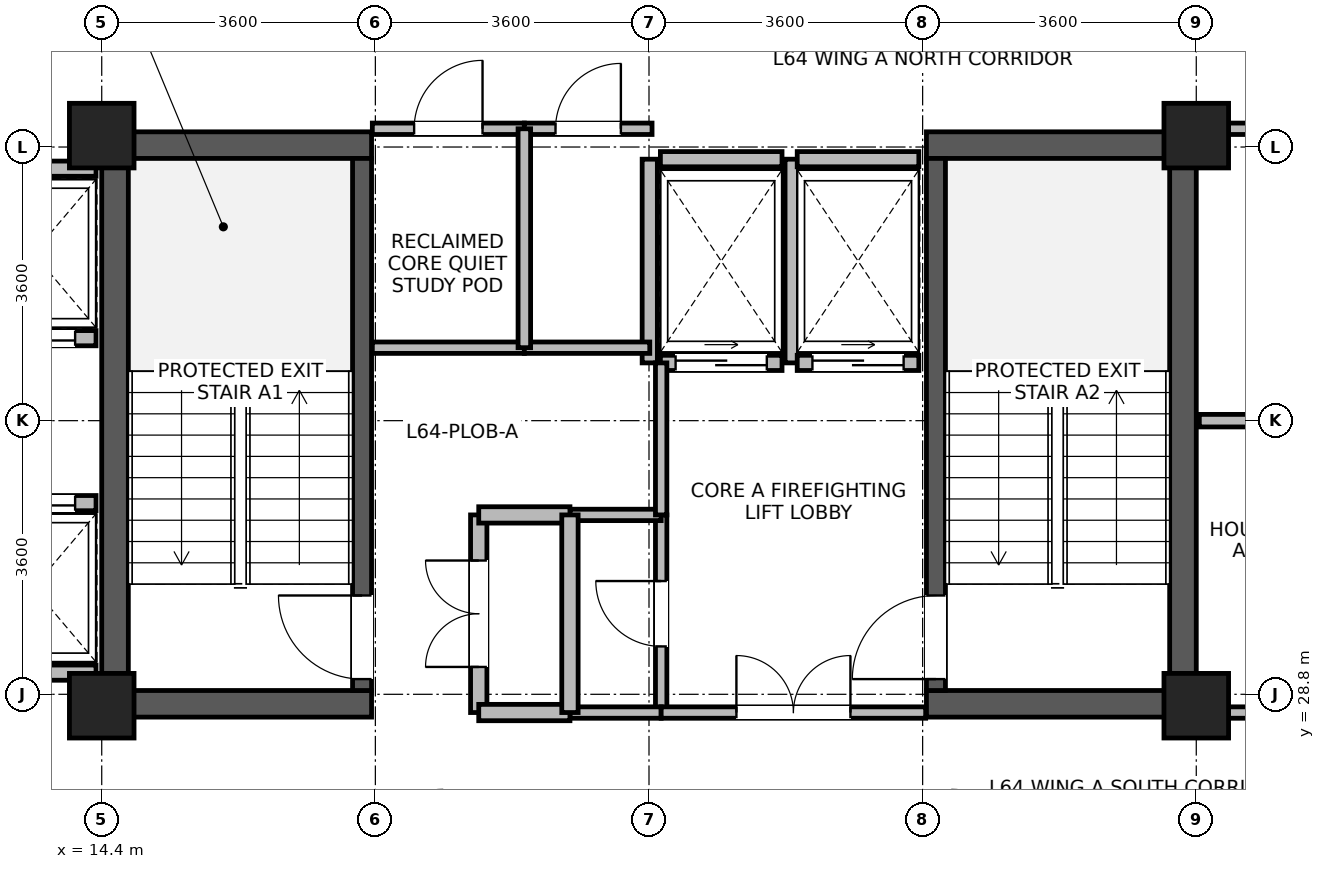
"""IFC4 building model, lengths in metres.
Left out: names, types, materials, properties, quantities, classifications, styles, units other than length and angle.
Written with IfcOpenShell. Run it as: python <this file> out.ifc"""

import sys

from ifc_helpers import new_model, si_unit, direction, frame, frame_2d, origin, origin_2d, place, context, subcontext, project, spatial, rectangle, extrude, source, transform, mapped, element, fill, save


model = new_model("IFC4")
c1 = context("Model", 3, precision=1e-05, world=origin(), true_north=direction((0.0, 1.0)))
c2 = subcontext(c1, "Body", "Model", "MODEL_VIEW")
j1 = project(units=[si_unit("LENGTHUNIT", "METRE"), si_unit("PLANEANGLEUNIT", "RADIAN")], contexts=[c1])
p1 = place(None, origin())
s1 = spatial("IfcSite", under=j1, at=p1, CompositionType="ELEMENT")
p2 = place(p1, origin())
s2 = spatial("IfcBuilding", under=s1, at=p2, CompositionType="ELEMENT")
p3 = place(p2, frame((0.0, 0.0, 249.9)))
s3 = spatial("IfcBuildingStorey", under=s2, at=p3, CompositionType="ELEMENT", Elevation=249.9)
for number, where, z_axis, x_axis in (
    (1, (14.575, 28.5, 0.0), (0.0, 0.0, 1.0), (0.0, 1.0, 0.0)),
    (2, (28.625, 28.5, 0.0), (0.0, 0.0, 1.0), (0.0, 1.0, 0.0)),
):
    element("IfcWall", number, at=place(p3, frame(where, z_axis=z_axis, x_axis=x_axis)), inside=s3, PredefinedType="SHEAR", context=c2, shape_type="SweptSolid", body=[
        extrude(rectangle(XDim=7.7, YDim=0.35, at=frame_2d((3.85, 0.0))), origin(), (0.0, 0.0, 1.0), 3.475),
    ])
for number, where, z_axis, x_axis in (
    (3, (14.75, 28.675, 0.0), (0.0, 0.0, 1.0), (1.0, 0.0, 0.0)),
    (4, (25.25, 28.675, 0.0), (0.0, 0.0, 1.0), (1.0, 0.0, 0.0)),
    (5, (14.75, 36.025, 0.0), (0.0, 0.0, 1.0), (1.0, 0.0, 0.0)),
    (6, (25.25, 36.025, 0.0), (0.0, 0.0, 1.0), (1.0, 0.0, 0.0)),
):
    element("IfcWall", number, at=place(p3, frame(where, z_axis=z_axis, x_axis=x_axis)), inside=s3, PredefinedType="SHEAR", context=c2, shape_type="SweptSolid", body=[
        extrude(rectangle(XDim=3.2, YDim=0.35, at=frame_2d((1.6, 0.0))), origin(), (0.0, 0.0, 1.0), 3.475),
    ])
p4 = place(p3, frame((17.825, 28.85, 0.0), z_axis=(0.0, 0.0, 1.0), x_axis=(0.0, 1.0, 0.0)))
e7 = element("IfcWall", 7, at=p4, inside=s3, PredefinedType="SHEAR", context=c2, shape_type="SweptSolid", body=[
    extrude(rectangle(XDim=7.0, YDim=0.25, at=frame_2d((3.5, 0.0))), origin(), (0.0, 0.0, 1.0), 3.475),
])
p5 = place(p4, frame((0.15, 0.0, 0.0)))
e8 = element("IfcOpeningElement", 8, at=p5, cuts=e7, PredefinedType="OPENING", context=c2, shape_type="SweptSolid", body=[
    extrude(rectangle(XDim=1.1, YDim=2.08, at=frame_2d((0.55, 1.04))), frame((0.0, 0.135, 0.0), z_axis=(0.0, -1.0, 0.0), x_axis=(1.0, 0.0, 0.0)), (0.0, 0.0, 1.0), 0.27),
])
p6 = place(p3, frame((25.375, 28.85, 0.0), z_axis=(0.0, 0.0, 1.0), x_axis=(0.0, 1.0, 0.0)))
e9 = element("IfcWall", 9, at=p6, inside=s3, PredefinedType="SHEAR", context=c2, shape_type="SweptSolid", body=[
    extrude(rectangle(XDim=7.0, YDim=0.25, at=frame_2d((3.5, 0.0))), origin(), (0.0, 0.0, 1.0), 3.475),
])
p7 = place(p6, frame((0.15, 0.0, 0.0)))
e10 = element("IfcOpeningElement", 10, at=p7, cuts=e9, PredefinedType="OPENING", context=c2, shape_type="SweptSolid", body=[
    extrude(rectangle(XDim=1.1, YDim=2.08, at=frame_2d((0.55, 1.04))), frame((0.0, 0.135, 0.0), z_axis=(0.0, -1.0, 0.0), x_axis=(1.0, 0.0, 0.0)), (0.0, 0.0, 1.0), 0.27),
])
m1 = source(origin(), c2, "Body", "SweptSolid", [
    extrude(rectangle(XDim=0.85, YDim=0.85, at=origin_2d()), origin(), (0.0, 0.0, 1.0), 3.7),
])
for number, where, z_axis, x_axis in (
    (11, (14.4, 28.65, 0.0), (0.0, 0.0, 1.0), (1.0, 0.0, 0.0)),
    (12, (14.4, 36.15, 0.0), (0.0, 0.0, 1.0), (1.0, 0.0, 0.0)),
    (13, (28.8, 28.65, 0.0), (0.0, 0.0, 1.0), (1.0, 0.0, 0.0)),
    (14, (28.8, 36.15, 0.0), (0.0, 0.0, 1.0), (1.0, 0.0, 0.0)),
):
    element("IfcColumn", number, at=place(p3, frame(where, z_axis=z_axis, x_axis=x_axis)), inside=s3, PredefinedType="COLUMN", context=c2, shape_type="MappedRepresentation", body=[
        mapped(m1, transform((0.0, 0.0, 0.0), x_axis=(1.0, 0.0, 0.0), y_axis=(0.0, 1.0, 0.0), z_axis=(0.0, 0.0, 1.0), scale=1.0)),
    ])
p8 = place(p3, frame((12.675, 33.485, 0.0), z_axis=(0.0, 0.0, 1.0), x_axis=(1.0, 0.0, 0.0)))
e15 = element("IfcWall", 15, at=p8, inside=s3, PredefinedType="PARTITIONING", context=c2, shape_type="SweptSolid", body=[
    extrude(rectangle(XDim=1.65, YDim=0.2, at=frame_2d((0.825, 0.0))), origin(), (0.0, 0.0, 1.0), 3.455),
])
p9 = place(p8, frame((0.275, 0.0, 0.0)))
e16 = element("IfcOpeningElement", 16, at=p9, cuts=e15, PredefinedType="OPENING", context=c2, shape_type="SweptSolid", body=[
    extrude(rectangle(XDim=1.1, YDim=2.12, at=frame_2d((0.55, 1.06))), frame((0.0, 0.11, 0.0), z_axis=(0.0, -1.0, 0.0), x_axis=(1.0, 0.0, 0.0)), (0.0, 0.0, 1.0), 0.22),
])
for number, where, z_axis, x_axis in (
    (17, (12.675, 35.715, 0.0), (0.0, 0.0, 1.0), (1.0, 0.0, 0.0)),
    (18, (12.675, 29.085, 0.0), (0.0, 0.0, 1.0), (1.0, 0.0, 0.0)),
):
    element("IfcWall", number, at=place(p3, frame(where, z_axis=z_axis, x_axis=x_axis)), inside=s3, PredefinedType="PARTITIONING", context=c2, shape_type="SweptSolid", body=[
        extrude(rectangle(XDim=1.65, YDim=0.2, at=frame_2d((0.825, 0.0))), origin(), (0.0, 0.0, 1.0), 3.455),
    ])
p10 = place(p3, frame((12.675, 31.315, 0.0), z_axis=(0.0, 0.0, 1.0), x_axis=(1.0, 0.0, 0.0)))
e19 = element("IfcWall", 19, at=p10, inside=s3, PredefinedType="PARTITIONING", context=c2, shape_type="SweptSolid", body=[
    extrude(rectangle(XDim=1.65, YDim=0.2, at=frame_2d((0.825, 0.0))), origin(), (0.0, 0.0, 1.0), 3.455),
])
p11 = place(p10, frame((0.275, 0.0, 0.0)))
e20 = element("IfcOpeningElement", 20, at=p11, cuts=e19, PredefinedType="OPENING", context=c2, shape_type="SweptSolid", body=[
    extrude(rectangle(XDim=1.1, YDim=2.12, at=frame_2d((0.55, 1.06))), frame((0.0, 0.11, 0.0), z_axis=(0.0, -1.0, 0.0), x_axis=(1.0, 0.0, 0.0)), (0.0, 0.0, 1.0), 0.22),
])
p12 = place(p3, frame((21.75, 33.16, 0.0), z_axis=(0.0, 0.0, 1.0), x_axis=(1.0, 0.0, 0.0)))
e21 = element("IfcWall", 21, at=p12, inside=s3, PredefinedType="PARTITIONING", context=c2, shape_type="SweptSolid", body=[
    extrude(rectangle(XDim=1.6, YDim=0.2, at=frame_2d((0.8, 0.0))), origin(), (0.0, 0.0, 1.0), 3.455),
])
p13 = place(p12, frame((0.2, 0.0, 0.0)))
e22 = element("IfcOpeningElement", 22, at=p13, cuts=e21, PredefinedType="OPENING", context=c2, shape_type="SweptSolid", body=[
    extrude(rectangle(XDim=1.2, YDim=2.12, at=frame_2d((0.6, 1.06))), frame((0.0, 0.11, 0.0), z_axis=(0.0, -1.0, 0.0), x_axis=(1.0, 0.0, 0.0)), (0.0, 0.0, 1.0), 0.22),
])
p14 = place(p3, frame((21.75, 35.84, 0.0), z_axis=(0.0, 0.0, 1.0), x_axis=(1.0, 0.0, 0.0)))
e23 = element("IfcWall", 23, at=p14, inside=s3, PredefinedType="PARTITIONING", context=c2, shape_type="SweptSolid", body=[
    extrude(rectangle(XDim=1.6, YDim=0.2, at=frame_2d((0.8, 0.0))), origin(), (0.0, 0.0, 1.0), 2.555),
])
for number, where, z_axis, x_axis in (
    (24, (21.61, 33.16, 0.0), (0.0, 0.0, 1.0), (0.0, 1.0, 0.0)),
    (25, (23.49, 33.16, 0.0), (0.0, 0.0, 1.0), (0.0, 1.0, 0.0)),
):
    element("IfcWall", number, at=place(p3, frame(where, z_axis=z_axis, x_axis=x_axis)), inside=s3, PredefinedType="PARTITIONING", context=c2, shape_type="SweptSolid", body=[
        extrude(rectangle(XDim=2.68, YDim=0.2, at=frame_2d((1.34, 0.0))), origin(), (0.0, 0.0, 1.0), 3.455),
    ])
p15 = place(p3, frame((23.55, 33.16, 0.0), z_axis=(0.0, 0.0, 1.0), x_axis=(1.0, 0.0, 0.0)))
e26 = element("IfcWall", 26, at=p15, inside=s3, PredefinedType="PARTITIONING", context=c2, shape_type="SweptSolid", body=[
    extrude(rectangle(XDim=1.6, YDim=0.2, at=frame_2d((0.8, 0.0))), origin(), (0.0, 0.0, 1.0), 3.455),
])
p16 = place(p15, frame((0.2, 0.0, 0.0)))
e27 = element("IfcOpeningElement", 27, at=p16, cuts=e26, PredefinedType="OPENING", context=c2, shape_type="SweptSolid", body=[
    extrude(rectangle(XDim=1.2, YDim=2.12, at=frame_2d((0.6, 1.06))), frame((0.0, 0.11, 0.0), z_axis=(0.0, -1.0, 0.0), x_axis=(1.0, 0.0, 0.0)), (0.0, 0.0, 1.0), 0.22),
])
p17 = place(p3, frame((23.55, 35.84, 0.0), z_axis=(0.0, 0.0, 1.0), x_axis=(1.0, 0.0, 0.0)))
e28 = element("IfcWall", 28, at=p17, inside=s3, PredefinedType="PARTITIONING", context=c2, shape_type="SweptSolid", body=[
    extrude(rectangle(XDim=1.6, YDim=0.2, at=frame_2d((0.8, 0.0))), origin(), (0.0, 0.0, 1.0), 2.555),
])
p18 = place(p3, frame((29.225, 36.24, 0.0), z_axis=(0.0, 0.0, 1.0), x_axis=(1.0, 0.0, 0.0)))
e29 = element("IfcWall", 29, at=p18, inside=s3, PredefinedType="PARTITIONING", context=c2, shape_type="SweptSolid", body=[
    extrude(rectangle(XDim=4.135, YDim=0.15, at=frame_2d((2.067, 0.0))), origin(), (0.0, 0.0, 1.0), 2.905),
])
p19 = place(p18, frame((1.417, 0.0, 0.0)))
e30 = element("IfcOpeningElement", 30, at=p19, cuts=e29, PredefinedType="OPENING", context=c2, shape_type="SweptSolid", body=[
    extrude(rectangle(XDim=1.3, YDim=2.12, at=frame_2d((0.65, 1.06))), frame((0.0, 0.085, 0.0), z_axis=(0.0, -1.0, 0.0), x_axis=(1.0, 0.0, 0.0)), (0.0, 0.0, 1.0), 0.17),
])
p20 = place(p3, frame((19.36, 28.56, 0.0), z_axis=(0.0, 0.0, 1.0), x_axis=(0.0, 1.0, 0.0)))
e31 = element("IfcWall", 31, at=p20, inside=s3, PredefinedType="PARTITIONING", context=c2, shape_type="SweptSolid", body=[
    extrude(rectangle(XDim=2.6, YDim=0.215, at=frame_2d((1.3, 0.0))), origin(), (0.0, 0.0, 1.0), 3.455),
])
p21 = place(p20, frame((0.6, 0.0, 0.0)))
e32 = element("IfcOpeningElement", 32, at=p21, cuts=e31, PredefinedType="OPENING", context=c2, shape_type="SweptSolid", body=[
    extrude(rectangle(XDim=1.4, YDim=2.15, at=frame_2d((0.7, 1.075))), frame((0.0, 0.118, 0.0), z_axis=(0.0, -1.0, 0.0), x_axis=(1.0, 0.0, 0.0)), (0.0, 0.0, 1.0), 0.235),
])
p22 = place(p3, frame((21.76, 28.56, 0.0), z_axis=(0.0, 0.0, 1.0), x_axis=(0.0, 1.0, 0.0)))
e33 = element("IfcWall", 33, at=p22, inside=s3, PredefinedType="PARTITIONING", context=c2, shape_type="SweptSolid", body=[
    extrude(rectangle(XDim=2.6, YDim=0.15, at=frame_2d((1.3, 0.0))), origin(), (0.0, 0.0, 1.0), 3.455),
])
p23 = place(p22, frame((0.87, 0.0, 0.0)))
e34 = element("IfcOpeningElement", 34, at=p23, cuts=e33, PredefinedType="OPENING", context=c2, shape_type="SweptSolid", body=[
    extrude(rectangle(XDim=0.86, YDim=2.02, at=frame_2d((0.43, 1.01))), frame((0.0, 0.085, 0.0), z_axis=(0.0, -1.0, 0.0), x_axis=(1.0, 0.0, 0.0)), (0.0, 0.0, 1.0), 0.17),
])
p24 = place(p3, frame((29.225, 28.56, 0.0), z_axis=(0.0, 0.0, 1.0), x_axis=(1.0, 0.0, 0.0)))
e35 = element("IfcWall", 35, at=p24, inside=s3, PredefinedType="PARTITIONING", context=c2, shape_type="SweptSolid", body=[
    extrude(rectangle(XDim=1.875, YDim=0.15, at=frame_2d((0.938, 0.0))), origin(), (0.0, 0.0, 1.0), 2.905),
])
p25 = place(p24, frame((0.508, 0.0, 0.0)))
e36 = element("IfcOpeningElement", 36, at=p25, cuts=e35, PredefinedType="OPENING", context=c2, shape_type="SweptSolid", body=[
    extrude(rectangle(XDim=0.86, YDim=2.02, at=frame_2d((0.43, 1.01))), frame((0.0, 0.085, 0.0), z_axis=(0.0, -1.0, 0.0), x_axis=(1.0, 0.0, 0.0)), (0.0, 0.0, 1.0), 0.17),
])
p26 = place(p3, frame((17.96, 33.36, 0.0), z_axis=(0.0, 0.0, 1.0), x_axis=(1.0, 0.0, 0.0)))
e37 = element("IfcWall", 37, at=p26, inside=s3, PredefinedType="PARTITIONING", context=c2, shape_type="SweptSolid", body=[
    extrude(rectangle(XDim=2.0, YDim=0.15, at=frame_2d((1.0, 0.0))), origin(), (0.0, 0.0, 1.0), 3.455),
])
p27 = place(p3, frame((17.96, 36.24, 0.0), z_axis=(0.0, 0.0, 1.0), x_axis=(1.0, 0.0, 0.0)))
e38 = element("IfcWall", 38, at=p27, inside=s3, PredefinedType="PARTITIONING", context=c2, shape_type="SweptSolid", body=[
    extrude(rectangle(XDim=2.0, YDim=0.15, at=frame_2d((1.0, 0.0))), origin(), (0.0, 0.0, 1.0), 2.555),
])
p28 = place(p27, frame((0.55, 0.0, 0.0)))
e39 = element("IfcOpeningElement", 39, at=p28, cuts=e38, PredefinedType="OPENING", context=c2, shape_type="SweptSolid", body=[
    extrude(rectangle(XDim=0.9, YDim=2.08, at=frame_2d((0.45, 1.04))), frame((0.0, 0.085, 0.0), z_axis=(0.0, -1.0, 0.0), x_axis=(1.0, 0.0, 0.0)), (0.0, 0.0, 1.0), 0.17),
])
p29 = place(p3, frame((19.96, 33.36, 0.0), z_axis=(0.0, 0.0, 1.0), x_axis=(1.0, 0.0, 0.0)))
e40 = element("IfcWall", 40, at=p29, inside=s3, PredefinedType="PARTITIONING", context=c2, shape_type="SweptSolid", body=[
    extrude(rectangle(XDim=1.65, YDim=0.15, at=frame_2d((0.825, 0.0))), origin(), (0.0, 0.0, 1.0), 3.455),
])
p30 = place(p3, frame((19.96, 36.24, 0.0), z_axis=(0.0, 0.0, 1.0), x_axis=(1.0, 0.0, 0.0)))
e41 = element("IfcWall", 41, at=p30, inside=s3, PredefinedType="PARTITIONING", context=c2, shape_type="SweptSolid", body=[
    extrude(rectangle(XDim=1.68, YDim=0.15, at=frame_2d((0.84, 0.0))), origin(), (0.0, 0.0, 1.0), 2.555),
])
p31 = place(p30, frame((0.41, 0.0, 0.0)))
e42 = element("IfcOpeningElement", 42, at=p31, cuts=e41, PredefinedType="OPENING", context=c2, shape_type="SweptSolid", body=[
    extrude(rectangle(XDim=0.86, YDim=2.02, at=frame_2d((0.43, 1.01))), frame((0.0, 0.085, 0.0), z_axis=(0.0, -1.0, 0.0), x_axis=(1.0, 0.0, 0.0)), (0.0, 0.0, 1.0), 0.17),
])
p32 = place(p3, frame((20.56, 28.56, 0.0), z_axis=(0.0, 0.0, 1.0), x_axis=(1.0, 0.0, 0.0)))
e43 = element("IfcWall", 43, at=p32, inside=s3, PredefinedType="PARTITIONING", context=c2, shape_type="SweptSolid", body=[
    extrude(rectangle(XDim=1.2, YDim=0.15, at=frame_2d((0.6, 0.0))), origin(), (0.0, 0.0, 1.0), 2.555),
])
p33 = place(p3, frame((20.56, 31.16, 0.0), z_axis=(0.0, 0.0, 1.0), x_axis=(1.0, 0.0, 0.0)))
e44 = element("IfcWall", 44, at=p33, inside=s3, PredefinedType="PARTITIONING", context=c2, shape_type="SweptSolid", body=[
    extrude(rectangle(XDim=1.2, YDim=0.15, at=frame_2d((0.6, 0.0))), origin(), (0.0, 0.0, 1.0), 3.455),
])
p34 = place(p3, frame((19.36, 28.56, 0.0), z_axis=(0.0, 0.0, 1.0), x_axis=(1.0, 0.0, 0.0)))
e45 = element("IfcWall", 45, at=p34, inside=s3, PredefinedType="PARTITIONING", context=c2, shape_type="SweptSolid", body=[
    extrude(rectangle(XDim=1.2, YDim=0.215, at=frame_2d((0.6, 0.0))), origin(), (0.0, 0.0, 1.0), 2.555),
])
p35 = place(p3, frame((19.36, 31.16, 0.0), z_axis=(0.0, 0.0, 1.0), x_axis=(1.0, 0.0, 0.0)))
e46 = element("IfcWall", 46, at=p35, inside=s3, PredefinedType="PARTITIONING", context=c2, shape_type="SweptSolid", body=[
    extrude(rectangle(XDim=1.2, YDim=0.215, at=frame_2d((0.6, 0.0))), origin(), (0.0, 0.0, 1.0), 3.455),
])
p36 = place(p3, frame((21.76, 28.56, 0.0), z_axis=(0.0, 0.0, 1.0), x_axis=(1.0, 0.0, 0.0)))
e47 = element("IfcWall", 47, at=p36, inside=s3, PredefinedType="PARTITIONING", context=c2, shape_type="SweptSolid", body=[
    extrude(rectangle(XDim=3.48, YDim=0.15, at=frame_2d((1.74, 0.0))), origin(), (0.0, 0.0, 1.0), 2.555),
])
p37 = place(p36, frame((0.99, 0.0, 0.0)))
e48 = element("IfcOpeningElement", 48, at=p37, cuts=e47, PredefinedType="OPENING", context=c2, shape_type="SweptSolid", body=[
    extrude(rectangle(XDim=1.5, YDim=2.1, at=frame_2d((0.75, 1.05))), frame((0.0, 0.085, 0.0), z_axis=(0.0, -1.0, 0.0), x_axis=(1.0, 0.0, 0.0)), (0.0, 0.0, 1.0), 0.17),
])
p38 = place(p3, frame((19.96, 33.36, 0.0), z_axis=(0.0, 0.0, 1.0), x_axis=(0.0, 1.0, 0.0)))
e49 = element("IfcWall", 49, at=p38, inside=s3, PredefinedType="PARTITIONING", context=c2, shape_type="SweptSolid", body=[
    extrude(rectangle(XDim=2.88, YDim=0.165, at=frame_2d((1.44, 0.0))), origin(), (0.0, 0.0, 1.0), 3.455),
])
p39 = place(p3, frame((20.56, 28.56, 0.0), z_axis=(0.0, 0.0, 1.0), x_axis=(0.0, 1.0, 0.0)))
e50 = element("IfcWall", 50, at=p39, inside=s3, PredefinedType="PARTITIONING", context=c2, shape_type="SweptSolid", body=[
    extrude(rectangle(XDim=2.6, YDim=0.215, at=frame_2d((1.3, 0.0))), origin(), (0.0, 0.0, 1.0), 3.455),
])
p40 = place(p3, frame((28.84, 32.4, 0.0), z_axis=(0.0, 0.0, 1.0), x_axis=(1.0, 0.0, 0.0)))
e51 = element("IfcWall", 51, at=p40, inside=s3, PredefinedType="PARTITIONING", context=c2, shape_type="SweptSolid", body=[
    extrude(rectangle(XDim=2.26, YDim=0.165, at=frame_2d((1.13, 0.0))), origin(), (0.0, 0.0, 1.0), 3.455),
])
p41 = place(p3, frame((21.76, 31.16, 0.0), z_axis=(0.0, 0.0, 1.0), x_axis=(0.0, 1.0, 0.0)))
e52 = element("IfcWall", 52, at=p41, inside=s3, PredefinedType="PARTITIONING", context=c2, shape_type="SweptSolid", body=[
    extrude(rectangle(XDim=2.0, YDim=0.15, at=frame_2d((1.0, 0.0))), origin(), (0.0, 0.0, 1.0), 3.455),
])
p42 = place(p5, origin())
e53 = element("IfcDoor", 53, at=p42, inside=s3, OperationType="SINGLE_SWING_RIGHT", PredefinedType="DOOR", context=c2, shape_type="SweptSolid", body=[
    extrude(rectangle(XDim=1.1, YDim=2.08, at=frame_2d((0.55, 1.04))), frame((0.0, 0.025, 0.0), z_axis=(0.0, -1.0, 0.0), x_axis=(1.0, 0.0, 0.0)), (0.0, 0.0, 1.0), 0.05),
])
fill(e8, e53)
p43 = place(p7, origin())
e54 = element("IfcDoor", 54, at=p43, inside=s3, OperationType="SINGLE_SWING_LEFT", PredefinedType="DOOR", context=c2, shape_type="SweptSolid", body=[
    extrude(rectangle(XDim=1.1, YDim=2.08, at=frame_2d((0.55, 1.04))), frame((0.0, 0.025, 0.0), z_axis=(0.0, -1.0, 0.0), x_axis=(1.0, 0.0, 0.0)), (0.0, 0.0, 1.0), 0.05),
])
fill(e10, e54)
p44 = place(p9, origin())
e55 = element("IfcDoor", 55, at=p44, inside=s3, OperationType="SLIDING_TO_LEFT", PredefinedType="DOOR", context=c2, shape_type="SweptSolid", body=[
    extrude(rectangle(XDim=1.1, YDim=2.12, at=frame_2d((0.55, 1.06))), frame((0.0, 0.025, 0.0), z_axis=(0.0, -1.0, 0.0), x_axis=(1.0, 0.0, 0.0)), (0.0, 0.0, 1.0), 0.05),
])
fill(e16, e55)
p45 = place(p11, origin())
e56 = element("IfcDoor", 56, at=p45, inside=s3, OperationType="SLIDING_TO_LEFT", PredefinedType="DOOR", context=c2, shape_type="SweptSolid", body=[
    extrude(rectangle(XDim=1.1, YDim=2.12, at=frame_2d((0.55, 1.06))), frame((0.0, 0.025, 0.0), z_axis=(0.0, -1.0, 0.0), x_axis=(1.0, 0.0, 0.0)), (0.0, 0.0, 1.0), 0.05),
])
fill(e20, e56)
p46 = place(p13, origin())
e57 = element("IfcDoor", 57, at=p46, inside=s3, OperationType="SLIDING_TO_RIGHT", PredefinedType="DOOR", context=c2, shape_type="SweptSolid", body=[
    extrude(rectangle(XDim=1.2, YDim=2.12, at=frame_2d((0.6, 1.06))), frame((0.0, 0.025, 0.0), z_axis=(0.0, -1.0, 0.0), x_axis=(1.0, 0.0, 0.0)), (0.0, 0.0, 1.0), 0.05),
])
fill(e22, e57)
p47 = place(p16, origin())
e58 = element("IfcDoor", 58, at=p47, inside=s3, OperationType="SLIDING_TO_RIGHT", PredefinedType="DOOR", context=c2, shape_type="SweptSolid", body=[
    extrude(rectangle(XDim=1.2, YDim=2.12, at=frame_2d((0.6, 1.06))), frame((0.0, 0.025, 0.0), z_axis=(0.0, -1.0, 0.0), x_axis=(1.0, 0.0, 0.0)), (0.0, 0.0, 1.0), 0.05),
])
fill(e27, e58)
p48 = place(p21, origin())
e59 = element("IfcDoor", 59, at=p48, inside=s3, OperationType="DOUBLE_DOOR_SINGLE_SWING", PredefinedType="DOOR", context=c2, shape_type="SweptSolid", body=[
    extrude(rectangle(XDim=1.4, YDim=2.15, at=frame_2d((0.7, 1.075))), frame((0.0, 0.025, 0.0), z_axis=(0.0, -1.0, 0.0), x_axis=(1.0, 0.0, 0.0)), (0.0, 0.0, 1.0), 0.05),
])
fill(e32, e59)
p49 = place(p23, origin())
e60 = element("IfcDoor", 60, at=p49, inside=s3, OperationType="SINGLE_SWING_RIGHT", PredefinedType="DOOR", context=c2, shape_type="SweptSolid", body=[
    extrude(rectangle(XDim=0.86, YDim=2.02, at=frame_2d((0.43, 1.01))), frame((0.0, 0.025, 0.0), z_axis=(0.0, -1.0, 0.0), x_axis=(1.0, 0.0, 0.0)), (0.0, 0.0, 1.0), 0.05),
])
fill(e34, e60)
p50 = place(p28, origin())
e61 = element("IfcDoor", 61, at=p50, inside=s3, OperationType="SINGLE_SWING_RIGHT", PredefinedType="DOOR", context=c2, shape_type="SweptSolid", body=[
    extrude(rectangle(XDim=0.9, YDim=2.08, at=frame_2d((0.45, 1.04))), frame((0.0, 0.025, 0.0), z_axis=(0.0, -1.0, 0.0), x_axis=(1.0, 0.0, 0.0)), (0.0, 0.0, 1.0), 0.05),
])
fill(e39, e61)
p51 = place(p31, origin())
e62 = element("IfcDoor", 62, at=p51, inside=s3, OperationType="SINGLE_SWING_RIGHT", PredefinedType="DOOR", context=c2, shape_type="SweptSolid", body=[
    extrude(rectangle(XDim=0.86, YDim=2.02, at=frame_2d((0.43, 1.01))), frame((0.0, 0.025, 0.0), z_axis=(0.0, -1.0, 0.0), x_axis=(1.0, 0.0, 0.0)), (0.0, 0.0, 1.0), 0.05),
])
fill(e42, e62)
p52 = place(p37, origin())
e63 = element("IfcDoor", 63, at=p52, inside=s3, OperationType="DOUBLE_DOOR_SINGLE_SWING", PredefinedType="DOOR", context=c2, shape_type="SweptSolid", body=[
    extrude(rectangle(XDim=1.5, YDim=2.1, at=frame_2d((0.75, 1.05))), frame((0.0, 0.025, 0.0), z_axis=(0.0, -1.0, 0.0), x_axis=(1.0, 0.0, 0.0)), (0.0, 0.0, 1.0), 0.05),
])
fill(e48, e63)
save(model, sys.argv[1])
